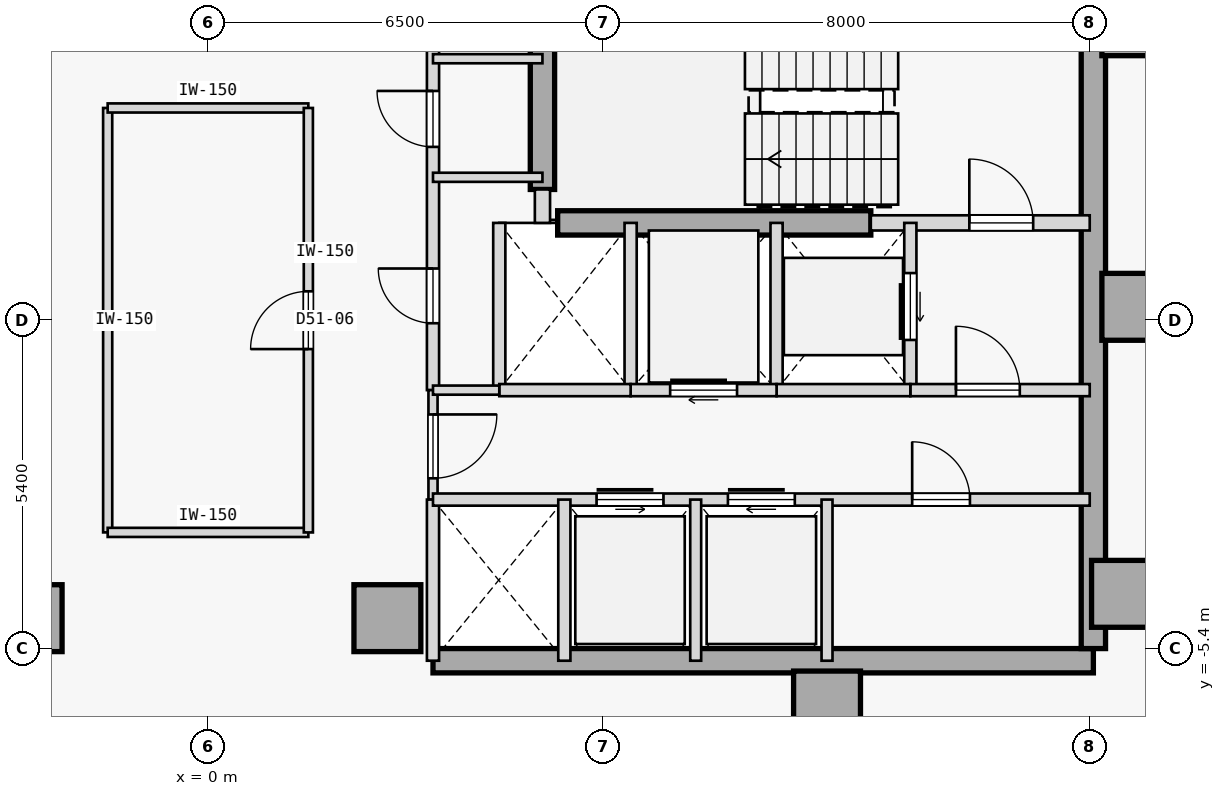
"""IFC4 building model, lengths in metres.
Left out: names, types, materials, properties, quantities, classifications, styles, units other than length and angle.
Written with IfcOpenShell. Run it as: python <this file> out.ifc"""

import sys

from ifc_helpers import new_model, si_unit, direction, frame, frame_2d, origin, origin_2d, place, context, subcontext, project, spatial, rectangle, extrude, element, fill, save


model = new_model("IFC4")
c1 = context("Model", 3, precision=1e-05, world=origin(), true_north=direction((0.0, 1.0)))
c2 = subcontext(c1, "Body", "Model", "MODEL_VIEW")
j1 = project(units=[si_unit("LENGTHUNIT", "METRE"), si_unit("PLANEANGLEUNIT", "RADIAN")], contexts=[c1])
p1 = place(None, origin())
s1 = spatial("IfcSite", under=j1, at=p1, CompositionType="ELEMENT")
p2 = place(p1, origin())
s2 = spatial("IfcBuilding", under=s1, at=p2, CompositionType="ELEMENT")
p3 = place(p2, frame((0.0, 0.0, 195.6)))
s3 = spatial("IfcBuildingStorey", under=s2, at=p3, CompositionType="ELEMENT", Elevation=195.6)
for number, where, z_axis, x_axis in (
    (1, (-2.95, -4.9, 0.0), (0.0, 0.0, 1.0), (1.0, 0.0, 0.0)),
    (2, (15.25, 4.9, 0.0), (0.0, 0.0, 1.0), (1.0, 0.0, 0.0)),
    (3, (15.25, 0.22, 0.0), (0.0, 0.0, 1.0), (1.0, 0.0, 0.0)),
    (4, (15.08, -4.5, 0.0), (0.0, 0.0, 1.0), (1.0, 0.0, 0.0)),
    (5, (10.18, -6.32, 0.0), (0.0, 0.0, 1.0), (1.0, 0.0, 0.0)),
    (6, (2.95, -4.9, 0.0), (0.0, 0.0, 1.0), (1.0, 0.0, 0.0)),
):
    element("IfcColumn", number, at=place(p3, frame(where, z_axis=z_axis, x_axis=x_axis)), inside=s3, PredefinedType="COLUMN", context=c2, shape_type="SweptSolid", body=[
        extrude(rectangle(XDim=1.1, YDim=1.1, at=origin_2d()), origin(), (0.0, 0.0, 1.0), 3.4),
    ])
p4 = place(p3, frame((3.7, -5.6, 0.0), z_axis=(0.0, 0.0, 1.0), x_axis=(1.0, 0.0, 0.0)))
e7 = element("IfcWall", 7, at=p4, inside=s3, PredefinedType="SHEAR", context=c2, shape_type="SweptSolid", body=[
    extrude(rectangle(XDim=10.86, YDim=0.4, at=frame_2d((5.43, 0.0))), origin(), (0.0, 0.0, 1.0), 3.175),
])
p5 = place(p3, frame((14.56, -5.4, 0.0), z_axis=(0.0, 0.0, 1.0), x_axis=(0.0, 1.0, 0.0)))
e8 = element("IfcWall", 8, at=p5, inside=s3, PredefinedType="SHEAR", context=c2, shape_type="SweptSolid", body=[
    extrude(rectangle(XDim=10.8, YDim=0.4, at=frame_2d((5.4, 0.0))), origin(), (0.0, 0.0, 1.0), 3.175),
])
p6 = place(p3, frame((5.5, 2.15, 0.0), z_axis=(0.0, 0.0, 1.0), x_axis=(0.0, 1.0, 0.0)))
e9 = element("IfcWall", 9, at=p6, inside=s3, PredefinedType="SHEAR", context=c2, shape_type="SweptSolid", body=[
    extrude(rectangle(XDim=3.25, YDim=0.4, at=frame_2d((1.625, 0.0))), origin(), (0.0, 0.0, 1.0), 3.175),
])
p7 = place(p3, frame((5.75, 1.6, 0.0), z_axis=(0.0, 0.0, 1.0), x_axis=(1.0, 0.0, 0.0)))
e10 = element("IfcWall", 10, at=p7, inside=s3, PredefinedType="SHEAR", context=c2, shape_type="SweptSolid", body=[
    extrude(rectangle(XDim=5.15, YDim=0.4, at=frame_2d((2.575, 0.0))), origin(), (0.0, 0.0, 1.0), 3.175),
])
p8 = place(p3, frame((10.9, 1.6, 0.0), z_axis=(0.0, 0.0, 1.0), x_axis=(1.0, 0.0, 0.0)))
e11 = element("IfcWall", 11, at=p8, inside=s3, PredefinedType="STANDARD", context=c2, shape_type="SweptSolid", body=[
    extrude(rectangle(XDim=3.6, YDim=0.25, at=frame_2d((1.8, 0.0))), origin(), (0.0, 0.0, 1.0), 3.175),
])
p9 = place(p8, frame((1.62, 0.0, 0.0)))
e12 = element("IfcOpeningElement", 12, at=p9, cuts=e11, PredefinedType="OPENING", context=c2, shape_type="SweptSolid", body=[
    extrude(rectangle(XDim=1.05, YDim=2.15, at=frame_2d((0.525, 1.075))), frame((0.0, 0.135, 0.0), z_axis=(0.0, -1.0, 0.0), x_axis=(1.0, 0.0, 0.0)), (0.0, 0.0, 1.0), 0.27),
])
p10 = place(p3, frame((5.5, 1.6, 0.0), z_axis=(0.0, 0.0, 1.0), x_axis=(0.0, 1.0, 0.0)))
e13 = element("IfcWall", 13, at=p10, inside=s3, PredefinedType="STANDARD", context=c2, shape_type="SweptSolid", body=[
    extrude(rectangle(XDim=0.55, YDim=0.25, at=frame_2d((0.275, 0.0))), origin(), (0.0, 0.0, 1.0), 3.175),
])
p11 = place(p3, frame((3.7, -1.15, 0.0), z_axis=(0.0, 0.0, 1.0), x_axis=(0.0, 1.0, 0.0)))
e14 = element("IfcWall", 14, at=p11, inside=s3, PredefinedType="STANDARD", context=c2, shape_type="SweptSolid", body=[
    extrude(rectangle(XDim=6.75, YDim=0.2, at=frame_2d((3.375, 0.0))), origin(), (0.0, 0.0, 1.0), 3.175),
])
p12 = place(p11, frame((1.1, 0.0, 0.0)))
e15 = element("IfcOpeningElement", 15, at=p12, cuts=e14, PredefinedType="OPENING", context=c2, shape_type="SweptSolid", body=[
    extrude(rectangle(XDim=0.9, YDim=2.15, at=frame_2d((0.45, 1.075))), frame((0.0, 0.11, 0.0), z_axis=(0.0, -1.0, 0.0), x_axis=(1.0, 0.0, 0.0)), (0.0, 0.0, 1.0), 0.22),
])
p13 = place(p11, frame((4.0, 0.0, 0.0)))
e16 = element("IfcOpeningElement", 16, at=p13, cuts=e14, PredefinedType="OPENING", context=c2, shape_type="SweptSolid", body=[
    extrude(rectangle(XDim=0.92, YDim=2.15, at=frame_2d((0.46, 1.075))), frame((0.0, 0.11, 0.0), z_axis=(0.0, -1.0, 0.0), x_axis=(1.0, 0.0, 0.0)), (0.0, 0.0, 1.0), 0.22),
])
p14 = place(p3, frame((3.7, -2.95, 0.0), z_axis=(0.0, 0.0, 1.0), x_axis=(0.0, 1.0, 0.0)))
e17 = element("IfcWall", 17, at=p14, inside=s3, PredefinedType="PARTITIONING", context=c2, shape_type="SweptSolid", body=[
    extrude(rectangle(XDim=1.8, YDim=0.15, at=frame_2d((0.9, 0.0))), origin(), (0.0, 0.0, 1.0), 3.175),
])
p15 = place(p14, frame((0.35, 0.0, 0.0)))
e18 = element("IfcOpeningElement", 18, at=p15, cuts=e17, PredefinedType="OPENING", context=c2, shape_type="SweptSolid", body=[
    extrude(rectangle(XDim=1.05, YDim=2.18, at=frame_2d((0.525, 1.09))), frame((0.0, 0.085, 0.0), z_axis=(0.0, -1.0, 0.0), x_axis=(1.0, 0.0, 0.0)), (0.0, 0.0, 1.0), 0.17),
])
p16 = place(p3, frame((3.7, -5.6, 0.0), z_axis=(0.0, 0.0, 1.0), x_axis=(0.0, 1.0, 0.0)))
e19 = element("IfcWall", 19, at=p16, inside=s3, PredefinedType="STANDARD", context=c2, shape_type="SweptSolid", body=[
    extrude(rectangle(XDim=2.65, YDim=0.2, at=frame_2d((1.325, 0.0))), origin(), (0.0, 0.0, 1.0), 3.175),
])
p17 = place(p3, frame((11.55, -1.15, 0.0), z_axis=(0.0, 0.0, 1.0), x_axis=(0.0, 1.0, 0.0)))
e20 = element("IfcWall", 20, at=p17, inside=s3, PredefinedType="STANDARD", context=c2, shape_type="SweptSolid", body=[
    extrude(rectangle(XDim=2.75, YDim=0.2, at=frame_2d((1.375, 0.0))), origin(), (0.0, 0.0, 1.0), 3.175),
])
p18 = place(p17, frame((0.825, 0.0, 0.0)))
e21 = element("IfcOpeningElement", 21, at=p18, cuts=e20, PredefinedType="OPENING", context=c2, shape_type="SweptSolid", body=[
    extrude(rectangle(XDim=1.1, YDim=2.15, at=frame_2d((0.55, 1.075))), frame((0.0, 0.11, 0.0), z_axis=(0.0, -1.0, 0.0), x_axis=(1.0, 0.0, 0.0)), (0.0, 0.0, 1.0), 0.22),
])
p19 = place(p3, frame((9.35, -1.15, 0.0), z_axis=(0.0, 0.0, 1.0), x_axis=(0.0, 1.0, 0.0)))
e22 = element("IfcWall", 22, at=p19, inside=s3, PredefinedType="STANDARD", context=c2, shape_type="SweptSolid", body=[
    extrude(rectangle(XDim=2.75, YDim=0.2, at=frame_2d((1.375, 0.0))), origin(), (0.0, 0.0, 1.0), 3.175),
])
p20 = place(p3, frame((11.55, -1.15, 0.0), z_axis=(0.0, 0.0, 1.0), x_axis=(1.0, 0.0, 0.0)))
e23 = element("IfcWall", 23, at=p20, inside=s3, PredefinedType="STANDARD", context=c2, shape_type="SweptSolid", body=[
    extrude(rectangle(XDim=2.95, YDim=0.2, at=frame_2d((1.475, 0.0))), origin(), (0.0, 0.0, 1.0), 3.175),
])
p21 = place(p20, frame((0.75, 0.0, 0.0)))
e24 = element("IfcOpeningElement", 24, at=p21, cuts=e23, PredefinedType="OPENING", context=c2, shape_type="SweptSolid", body=[
    extrude(rectangle(XDim=1.05, YDim=2.18, at=frame_2d((0.525, 1.09))), frame((0.0, 0.11, 0.0), z_axis=(0.0, -1.0, 0.0), x_axis=(1.0, 0.0, 0.0)), (0.0, 0.0, 1.0), 0.22),
])
p22 = place(p3, frame((9.35, -1.15, 0.0), z_axis=(0.0, 0.0, 1.0), x_axis=(1.0, 0.0, 0.0)))
e25 = element("IfcWall", 25, at=p22, inside=s3, PredefinedType="STANDARD", context=c2, shape_type="SweptSolid", body=[
    extrude(rectangle(XDim=2.2, YDim=0.2, at=frame_2d((1.1, 0.0))), origin(), (0.0, 0.0, 1.0), 3.175),
])
p23 = place(p3, frame((6.95, -1.15, 0.0), z_axis=(0.0, 0.0, 1.0), x_axis=(0.0, 1.0, 0.0)))
e26 = element("IfcWall", 26, at=p23, inside=s3, PredefinedType="STANDARD", context=c2, shape_type="SweptSolid", body=[
    extrude(rectangle(XDim=2.75, YDim=0.2, at=frame_2d((1.375, 0.0))), origin(), (0.0, 0.0, 1.0), 3.175),
])
p24 = place(p3, frame((6.95, -1.15, 0.0), z_axis=(0.0, 0.0, 1.0), x_axis=(1.0, 0.0, 0.0)))
e27 = element("IfcWall", 27, at=p24, inside=s3, PredefinedType="STANDARD", context=c2, shape_type="SweptSolid", body=[
    extrude(rectangle(XDim=2.4, YDim=0.2, at=frame_2d((1.2, 0.0))), origin(), (0.0, 0.0, 1.0), 3.175),
])
p25 = place(p24, frame((0.65, 0.0, 0.0)))
e28 = element("IfcOpeningElement", 28, at=p25, cuts=e27, PredefinedType="OPENING", context=c2, shape_type="SweptSolid", body=[
    extrude(rectangle(XDim=1.1, YDim=2.15, at=frame_2d((0.55, 1.075))), frame((0.0, 0.11, 0.0), z_axis=(0.0, -1.0, 0.0), x_axis=(1.0, 0.0, 0.0)), (0.0, 0.0, 1.0), 0.22),
])
p26 = place(p3, frame((4.79, -1.15, 0.0), z_axis=(0.0, 0.0, 1.0), x_axis=(0.0, 1.0, 0.0)))
e29 = element("IfcWall", 29, at=p26, inside=s3, PredefinedType="STANDARD", context=c2, shape_type="SweptSolid", body=[
    extrude(rectangle(XDim=2.75, YDim=0.2, at=frame_2d((1.375, 0.0))), origin(), (0.0, 0.0, 1.0), 3.175),
])
p27 = place(p3, frame((4.79, -1.15, 0.0), z_axis=(0.0, 0.0, 1.0), x_axis=(1.0, 0.0, 0.0)))
e30 = element("IfcWall", 30, at=p27, inside=s3, PredefinedType="STANDARD", context=c2, shape_type="SweptSolid", body=[
    extrude(rectangle(XDim=2.16, YDim=0.2, at=frame_2d((1.08, 0.0))), origin(), (0.0, 0.0, 1.0), 3.175),
])
p28 = place(p3, frame((3.7, -1.15, 0.0), z_axis=(0.0, 0.0, 1.0), x_axis=(1.0, 0.0, 0.0)))
e31 = element("IfcWall", 31, at=p28, inside=s3, PredefinedType="PARTITIONING", context=c2, shape_type="SweptSolid", body=[
    extrude(rectangle(XDim=1.09, YDim=0.15, at=frame_2d((0.545, 0.0))), origin(), (0.0, 0.0, 1.0), 3.175),
])
p29 = place(p3, frame((3.7, -2.95, 0.0), z_axis=(0.0, 0.0, 1.0), x_axis=(1.0, 0.0, 0.0)))
e32 = element("IfcWall", 32, at=p29, inside=s3, PredefinedType="STANDARD", context=c2, shape_type="SweptSolid", body=[
    extrude(rectangle(XDim=10.8, YDim=0.2, at=frame_2d((5.4, 0.0))), origin(), (0.0, 0.0, 1.0), 3.175),
])
p30 = place(p29, frame((2.69, 0.0, 0.0)))
e33 = element("IfcOpeningElement", 33, at=p30, cuts=e32, PredefinedType="OPENING", context=c2, shape_type="SweptSolid", body=[
    extrude(rectangle(XDim=1.1, YDim=2.15, at=frame_2d((0.55, 1.075))), frame((0.0, 0.11, 0.0), z_axis=(0.0, -1.0, 0.0), x_axis=(1.0, 0.0, 0.0)), (0.0, 0.0, 1.0), 0.22),
])
p31 = place(p29, frame((4.85, 0.0, 0.0)))
e34 = element("IfcOpeningElement", 34, at=p31, cuts=e32, PredefinedType="OPENING", context=c2, shape_type="SweptSolid", body=[
    extrude(rectangle(XDim=1.1, YDim=2.15, at=frame_2d((0.55, 1.075))), frame((0.0, 0.11, 0.0), z_axis=(0.0, -1.0, 0.0), x_axis=(1.0, 0.0, 0.0)), (0.0, 0.0, 1.0), 0.22),
])
p32 = place(p29, frame((7.88, 0.0, 0.0)))
e35 = element("IfcOpeningElement", 35, at=p32, cuts=e32, PredefinedType="OPENING", context=c2, shape_type="SweptSolid", body=[
    extrude(rectangle(XDim=0.95, YDim=2.15, at=frame_2d((0.475, 1.075))), frame((0.0, 0.11, 0.0), z_axis=(0.0, -1.0, 0.0), x_axis=(1.0, 0.0, 0.0)), (0.0, 0.0, 1.0), 0.22),
])
p33 = place(p3, frame((5.86, -5.6, 0.0), z_axis=(0.0, 0.0, 1.0), x_axis=(0.0, 1.0, 0.0)))
e36 = element("IfcWall", 36, at=p33, inside=s3, PredefinedType="STANDARD", context=c2, shape_type="SweptSolid", body=[
    extrude(rectangle(XDim=2.65, YDim=0.2, at=frame_2d((1.325, 0.0))), origin(), (0.0, 0.0, 1.0), 3.175),
])
for number, where, z_axis, x_axis in (
    (37, (10.18, -5.6, 0.0), (0.0, 0.0, 1.0), (0.0, 1.0, 0.0)),
    (38, (8.02, -5.6, 0.0), (0.0, 0.0, 1.0), (0.0, 1.0, 0.0)),
):
    element("IfcWall", number, at=place(p3, frame(where, z_axis=z_axis, x_axis=x_axis)), inside=s3, PredefinedType="STANDARD", context=c2, shape_type="SweptSolid", body=[
        extrude(rectangle(XDim=2.65, YDim=0.18, at=frame_2d((1.325, 0.0))), origin(), (0.0, 0.0, 1.0), 3.175),
    ])
for number, where, z_axis, x_axis in (
    (39, (3.7, 4.3, 0.0), (0.0, 0.0, 1.0), (1.0, 0.0, 0.0)),
    (40, (3.7, 2.35, 0.0), (0.0, 0.0, 1.0), (1.0, 0.0, 0.0)),
):
    element("IfcWall", number, at=place(p3, frame(where, z_axis=z_axis, x_axis=x_axis)), inside=s3, PredefinedType="PARTITIONING", context=c2, shape_type="SweptSolid", body=[
        extrude(rectangle(XDim=1.8, YDim=0.15, at=frame_2d((0.9, 0.0))), origin(), (0.0, 0.0, 1.0), 3.175),
    ])
p34 = place(p3, frame((-1.65, -3.49, 0.0), z_axis=(0.0, 0.0, 1.0), x_axis=(-3.4979712e-05, 0.999999999388, 0.0)))
e41 = element("IfcWall", 41, at=p34, inside=s3, PredefinedType="PARTITIONING", context=c2, shape_type="SweptSolid", body=[
    extrude(rectangle(XDim=6.979, YDim=0.15, at=frame_2d((3.49, 0.0))), origin(), (0.0, 0.0, 1.0), 3.175),
])
p35 = place(p3, frame((-1.65, -3.49, 0.0), z_axis=(0.0, 0.0, 1.0), x_axis=(0.999999975374, -0.000221926315, 0.0)))
e42 = element("IfcWall", 42, at=p35, inside=s3, PredefinedType="PARTITIONING", context=c2, shape_type="SweptSolid", body=[
    extrude(rectangle(XDim=3.3, YDim=0.15, at=frame_2d((1.65, 0.0))), origin(), (0.0, 0.0, 1.0), 3.175),
])
p36 = place(p3, frame((-1.65, 3.49, 0.0), z_axis=(0.0, 0.0, 1.0), x_axis=(1.0, 0.0, 0.0)))
e43 = element("IfcWall", 43, at=p36, inside=s3, PredefinedType="PARTITIONING", context=c2, shape_type="SweptSolid", body=[
    extrude(rectangle(XDim=3.3, YDim=0.15, at=frame_2d((1.65, 0.0))), origin(), (0.0, 0.0, 1.0), 3.175),
])
p37 = place(p3, frame((1.65, -3.49, 0.0), z_axis=(0.0, 0.0, 1.0), x_axis=(-6.9952083e-05, 0.999999997553, 0.0)))
e44 = element("IfcWall", 44, at=p37, inside=s3, PredefinedType="PARTITIONING", context=c2, shape_type="SweptSolid", body=[
    extrude(rectangle(XDim=6.98, YDim=0.15, at=frame_2d((3.49, 0.0))), origin(), (0.0, 0.0, 1.0), 3.175),
])
p38 = place(p37, frame((3.015, 0.0, 0.0)))
e45 = element("IfcOpeningElement", 45, at=p38, cuts=e44, PredefinedType="OPENING", context=c2, shape_type="SweptSolid", body=[
    extrude(rectangle(XDim=0.95, YDim=2.15, at=frame_2d((0.475, 1.075))), frame((0.0, 0.085, 0.0), z_axis=(0.0, -1.0, 0.0), x_axis=(1.0, 0.0, 0.0)), (0.0, 0.0, 1.0), 0.17),
])
p39 = place(p9, origin())
e46 = element("IfcDoor", 46, at=p39, inside=s3, OperationType="SINGLE_SWING_LEFT", PredefinedType="DOOR", context=c2, shape_type="SweptSolid", body=[
    extrude(rectangle(XDim=1.05, YDim=2.15, at=frame_2d((0.525, 1.075))), frame((0.0, 0.025, 0.0), z_axis=(0.0, -1.0, 0.0), x_axis=(1.0, 0.0, 0.0)), (0.0, 0.0, 1.0), 0.05),
])
fill(e12, e46)
p40 = place(p21, origin())
e47 = element("IfcDoor", 47, at=p40, inside=s3, OperationType="SINGLE_SWING_LEFT", PredefinedType="DOOR", context=c2, shape_type="SweptSolid", body=[
    extrude(rectangle(XDim=1.05, YDim=2.18, at=frame_2d((0.525, 1.09))), frame((0.0, 0.025, 0.0), z_axis=(0.0, -1.0, 0.0), x_axis=(1.0, 0.0, 0.0)), (0.0, 0.0, 1.0), 0.05),
])
fill(e24, e47)
p41 = place(p15, frame((1.05, 0.0, 0.0), z_axis=(0.0, 0.0, 1.0), x_axis=(-1.0, 0.0, 0.0)))
e48 = element("IfcDoor", 48, at=p41, inside=s3, OperationType="SINGLE_SWING_RIGHT", PredefinedType="DOOR", context=c2, shape_type="SweptSolid", body=[
    extrude(rectangle(XDim=1.05, YDim=2.18, at=frame_2d((0.525, 1.09))), frame((0.0, 0.025, 0.0), z_axis=(0.0, -1.0, 0.0), x_axis=(1.0, 0.0, 0.0)), (0.0, 0.0, 1.0), 0.05),
])
fill(e18, e48)
p42 = place(p18, origin())
e49 = element("IfcDoor", 49, at=p42, inside=s3, OperationType="SLIDING_TO_RIGHT", PredefinedType="DOOR", context=c2, shape_type="SweptSolid", body=[
    extrude(rectangle(XDim=1.1, YDim=2.15, at=frame_2d((0.55, 1.075))), frame((0.0, 0.025, 0.0), z_axis=(0.0, -1.0, 0.0), x_axis=(1.0, 0.0, 0.0)), (0.0, 0.0, 1.0), 0.05),
])
fill(e21, e49)
p43 = place(p25, origin())
e50 = element("IfcDoor", 50, at=p43, inside=s3, OperationType="SLIDING_TO_RIGHT", PredefinedType="DOOR", context=c2, shape_type="SweptSolid", body=[
    extrude(rectangle(XDim=1.1, YDim=2.15, at=frame_2d((0.55, 1.075))), frame((0.0, 0.025, 0.0), z_axis=(0.0, -1.0, 0.0), x_axis=(1.0, 0.0, 0.0)), (0.0, 0.0, 1.0), 0.05),
])
fill(e28, e50)
p44 = place(p30, origin())
e51 = element("IfcDoor", 51, at=p44, inside=s3, OperationType="SLIDING_TO_LEFT", PredefinedType="DOOR", context=c2, shape_type="SweptSolid", body=[
    extrude(rectangle(XDim=1.1, YDim=2.15, at=frame_2d((0.55, 1.075))), frame((0.0, 0.025, 0.0), z_axis=(0.0, -1.0, 0.0), x_axis=(1.0, 0.0, 0.0)), (0.0, 0.0, 1.0), 0.05),
])
fill(e33, e51)
p45 = place(p31, origin())
e52 = element("IfcDoor", 52, at=p45, inside=s3, OperationType="SLIDING_TO_RIGHT", PredefinedType="DOOR", context=c2, shape_type="SweptSolid", body=[
    extrude(rectangle(XDim=1.1, YDim=2.15, at=frame_2d((0.55, 1.075))), frame((0.0, 0.025, 0.0), z_axis=(0.0, -1.0, 0.0), x_axis=(1.0, 0.0, 0.0)), (0.0, 0.0, 1.0), 0.05),
])
fill(e34, e52)
p46 = place(p32, origin())
e53 = element("IfcDoor", 53, at=p46, inside=s3, OperationType="SINGLE_SWING_LEFT", PredefinedType="DOOR", context=c2, shape_type="SweptSolid", body=[
    extrude(rectangle(XDim=0.95, YDim=2.15, at=frame_2d((0.475, 1.075))), frame((0.0, 0.025, 0.0), z_axis=(0.0, -1.0, 0.0), x_axis=(1.0, 0.0, 0.0)), (0.0, 0.0, 1.0), 0.05),
])
fill(e35, e53)
p47 = place(p12, origin())
e54 = element("IfcDoor", 54, at=p47, inside=s3, OperationType="SINGLE_SWING_RIGHT", PredefinedType="DOOR", context=c2, shape_type="SweptSolid", body=[
    extrude(rectangle(XDim=0.9, YDim=2.15, at=frame_2d((0.45, 1.075))), frame((0.0, 0.025, 0.0), z_axis=(0.0, -1.0, 0.0), x_axis=(1.0, 0.0, 0.0)), (0.0, 0.0, 1.0), 0.05),
])
fill(e15, e54)
p48 = place(p13, origin())
e55 = element("IfcDoor", 55, at=p48, inside=s3, OperationType="SINGLE_SWING_RIGHT", PredefinedType="DOOR", context=c2, shape_type="SweptSolid", body=[
    extrude(rectangle(XDim=0.92, YDim=2.15, at=frame_2d((0.46, 1.075))), frame((0.0, 0.025, 0.0), z_axis=(0.0, -1.0, 0.0), x_axis=(1.0, 0.0, 0.0)), (0.0, 0.0, 1.0), 0.05),
])
fill(e16, e55)
p49 = place(p38, origin())
e56 = element("IfcDoor", 56, at=p49, inside=s3, OperationType="SINGLE_SWING_LEFT", PredefinedType="DOOR", context=c2, shape_type="SweptSolid", body=[
    extrude(rectangle(XDim=0.95, YDim=2.15, at=frame_2d((0.475, 1.075))), frame((0.0, 0.025, 0.0), z_axis=(0.0, -1.0, 0.0), x_axis=(1.0, 0.0, 0.0)), (0.0, 0.0, 1.0), 0.05),
])
fill(e45, e56)
save(model, sys.argv[1])
